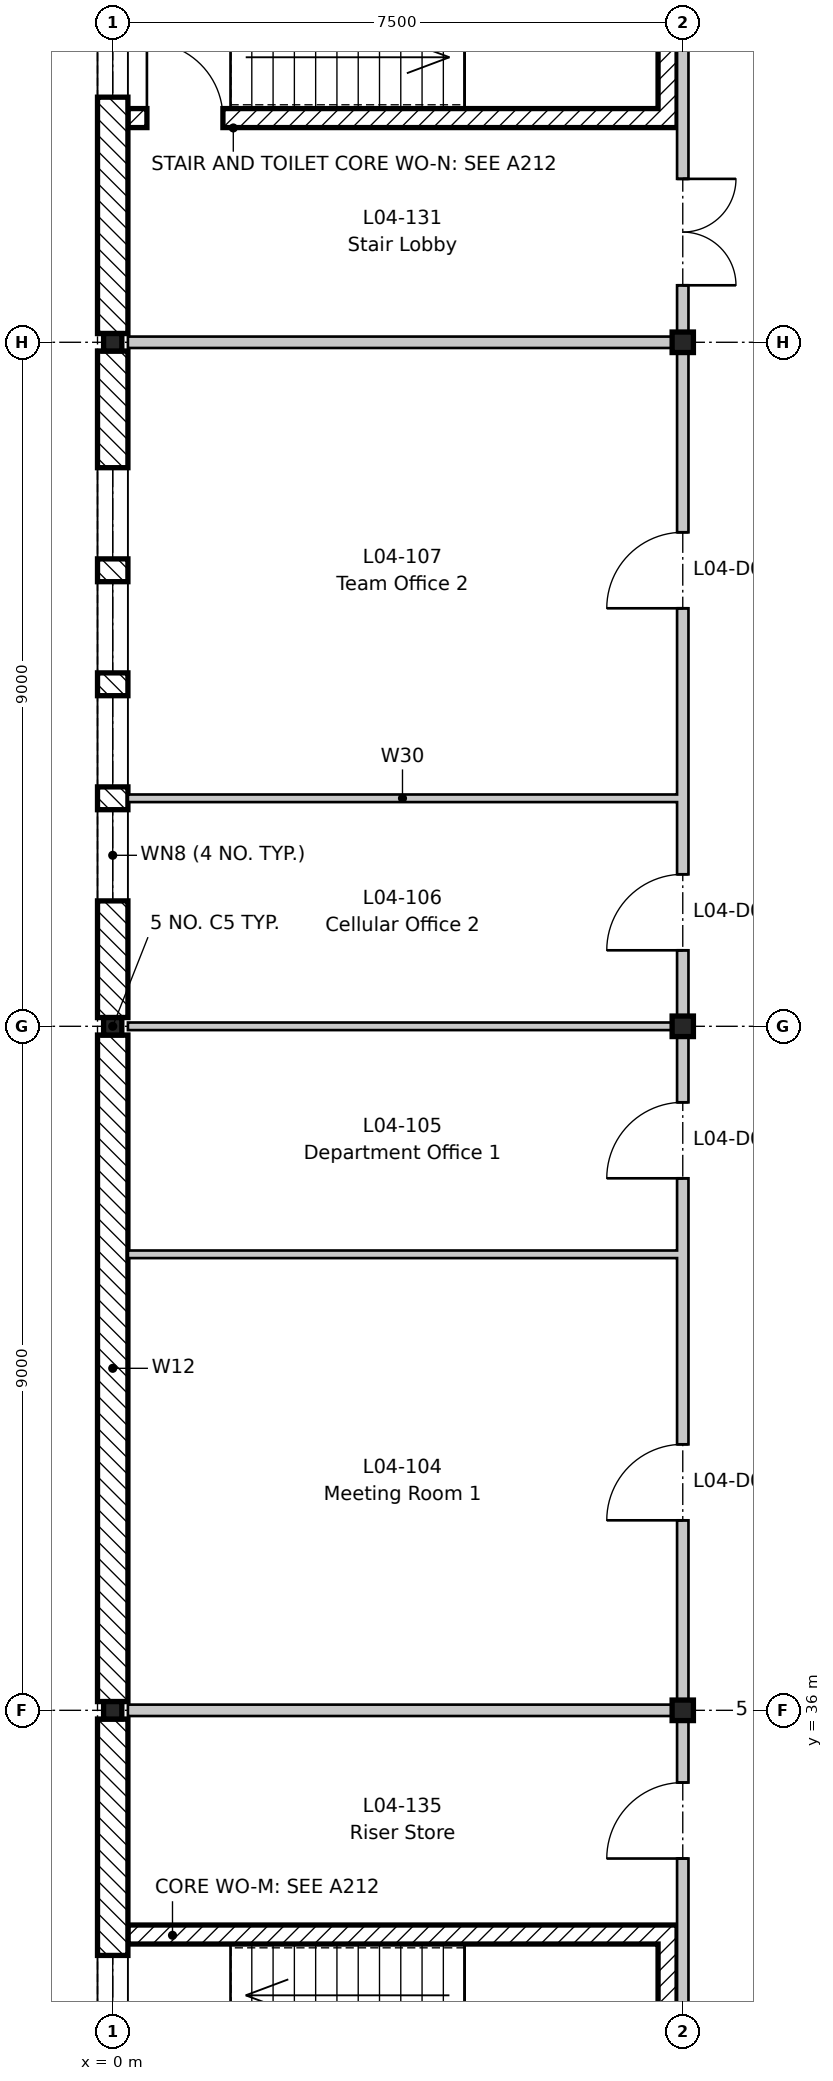
"""IFC4 building model, lengths in metres.
Left out: names, types, materials, properties, quantities, classifications, styles, units other than length and angle.
Written with IfcOpenShell. Run it as: python <this file> out.ifc"""

import sys

from ifc_helpers import new_model, si_unit, direction, frame, frame_2d, origin, origin_2d, place, context, subcontext, project, spatial, rectangle, i_section, extrude, element, fill, save


model = new_model("IFC4")
c1 = context("Model", 3, precision=1e-05, world=origin(), true_north=direction((0.0, 1.0)))
c2 = subcontext(c1, "Body", "Model", "MODEL_VIEW")
j1 = project(units=[si_unit("LENGTHUNIT", "METRE"), si_unit("PLANEANGLEUNIT", "RADIAN")], contexts=[c1])
p1 = place(None, origin())
s1 = spatial("IfcSite", under=j1, at=p1, CompositionType="ELEMENT")
p2 = place(p1, origin())
s2 = spatial("IfcBuilding", under=s1, at=p2, CompositionType="ELEMENT")
p3 = place(p2, frame((0.0, 0.0, 18.6)))
s3 = spatial("IfcBuildingStorey", under=s2, at=p3, CompositionType="ELEMENT", Elevation=18.6)
for number, where, z_axis, x_axis in (
    (1, (0.0, 36.0, -0.2), (0.0, 0.0, 1.0), (1.0, 0.0, 0.0)),
    (2, (0.0, 45.0, -0.2), (0.0, 0.0, 1.0), (1.0, 0.0, 0.0)),
    (3, (0.0, 54.0, -0.2), (0.0, 0.0, 1.0), (1.0, 0.0, 0.0)),
):
    element("IfcColumn", number, at=place(p3, frame(where, z_axis=z_axis, x_axis=x_axis)), inside=s3, PredefinedType="COLUMN", context=c2, shape_type="SweptSolid", body=[
        extrude(i_section(OverallWidth=0.24, OverallDepth=0.23, WebThickness=0.008, FlangeThickness=0.012, FilletRadius=0.021, at=origin_2d()), origin(), (0.0, 0.0, 1.0), 4.2),
    ])
for number, where, z_axis, x_axis in (
    (4, (7.5, 36.0, -0.2), (0.0, 0.0, 1.0), (1.0, 0.0, 0.0)),
    (5, (7.5, 45.0, -0.2), (0.0, 0.0, 1.0), (1.0, 0.0, 0.0)),
    (6, (7.5, 54.0, -0.2), (0.0, 0.0, 1.0), (1.0, 0.0, 0.0)),
):
    element("IfcColumn", number, at=place(p3, frame(where, z_axis=z_axis, x_axis=x_axis)), inside=s3, PredefinedType="COLUMN", context=c2, shape_type="SweptSolid", body=[
        extrude(i_section(OverallWidth=0.28, OverallDepth=0.27, WebThickness=0.008, FlangeThickness=0.013, FilletRadius=0.024, at=origin_2d()), origin(), (0.0, 0.0, 1.0), 4.2),
    ])
p4 = place(p3, frame((0.2, 56.95, 0.0), z_axis=(0.0, 0.0, 1.0), x_axis=(1.0, 0.0, 0.0)))
e7 = element("IfcWall", 7, at=p4, inside=s3, PredefinedType="SHEAR", context=c2, shape_type="SweptSolid", body=[
    extrude(rectangle(XDim=7.225, YDim=0.25, at=frame_2d((3.613, 0.0))), origin(), (0.0, 0.0, 1.0), 4.0),
])
p5 = place(p4, frame((0.25, 0.0, 0.0)))
e8 = element("IfcOpeningElement", 8, at=p5, cuts=e7, PredefinedType="OPENING", context=c2, shape_type="SweptSolid", body=[
    extrude(rectangle(XDim=1.0, YDim=2.1, at=frame_2d((0.5, 1.05))), frame((0.0, 0.135, 0.0), z_axis=(0.0, -1.0, 0.0), x_axis=(1.0, 0.0, 0.0)), (0.0, 0.0, 1.0), 0.27),
])
p6 = place(p3, frame((7.3, 57.075, 0.0), z_axis=(0.0, 0.0, 1.0), x_axis=(0.0, 1.0, 0.0)))
e9 = element("IfcWall", 9, at=p6, inside=s3, PredefinedType="SHEAR", context=c2, shape_type="SweptSolid", body=[
    extrude(rectangle(XDim=2.85, YDim=0.25, at=frame_2d((1.425, 0.0))), origin(), (0.0, 0.0, 1.0), 4.0),
])
p7 = place(p3, frame((0.2, 33.05, 0.0), z_axis=(0.0, 0.0, 1.0), x_axis=(1.0, 0.0, 0.0)))
e10 = element("IfcWall", 10, at=p7, inside=s3, PredefinedType="SHEAR", context=c2, shape_type="SweptSolid", body=[
    extrude(rectangle(XDim=7.225, YDim=0.25, at=frame_2d((3.613, 0.0))), origin(), (0.0, 0.0, 1.0), 4.0),
])
p8 = place(p3, frame((7.3, 30.075, 0.0), z_axis=(0.0, 0.0, 1.0), x_axis=(0.0, 1.0, 0.0)))
e11 = element("IfcWall", 11, at=p8, inside=s3, PredefinedType="SHEAR", context=c2, shape_type="SweptSolid", body=[
    extrude(rectangle(XDim=2.85, YDim=0.25, at=frame_2d((1.425, 0.0))), origin(), (0.0, 0.0, 1.0), 4.0),
])
p9 = place(p3, frame((0.0, 27.115, 0.0), z_axis=(0.0, 0.0, 1.0), x_axis=(0.0, 1.0, 0.0)))
e12 = element("IfcWall", 12, at=p9, inside=s3, PredefinedType="STANDARD", context=c2, shape_type="SweptSolid", body=[
    extrude(rectangle(XDim=8.77, YDim=0.4, at=frame_2d((4.385, 0.0))), origin(), (0.0, 0.0, 1.0), 3.6),
])
p10 = place(p9, frame((3.11, 0.0, 0.9)))
e13 = element("IfcOpeningElement", 13, at=p10, cuts=e12, PredefinedType="OPENING", context=c2, shape_type="SweptSolid", body=[
    extrude(rectangle(XDim=1.05, YDim=2.6, at=frame_2d((0.525, 1.3))), frame((0.0, 0.21, 0.0), z_axis=(0.0, -1.0, 0.0), x_axis=(1.0, 0.0, 0.0)), (0.0, 0.0, 1.0), 0.42),
])
p11 = place(p9, frame((4.61, 0.0, 0.9)))
e14 = element("IfcOpeningElement", 14, at=p11, cuts=e12, PredefinedType="OPENING", context=c2, shape_type="SweptSolid", body=[
    extrude(rectangle(XDim=1.05, YDim=2.6, at=frame_2d((0.525, 1.3))), frame((0.0, 0.21, 0.0), z_axis=(0.0, -1.0, 0.0), x_axis=(1.0, 0.0, 0.0)), (0.0, 0.0, 1.0), 0.42),
])
p12 = place(p3, frame((0.0, 36.115, 0.0), z_axis=(0.0, 0.0, 1.0), x_axis=(0.0, 1.0, 0.0)))
e15 = element("IfcWall", 15, at=p12, inside=s3, PredefinedType="STANDARD", context=c2, shape_type="SweptSolid", body=[
    extrude(rectangle(XDim=8.77, YDim=0.4, at=frame_2d((4.385, 0.0))), origin(), (0.0, 0.0, 1.0), 3.6),
])
p13 = place(p3, frame((0.0, 45.115, 0.0), z_axis=(0.0, 0.0, 1.0), x_axis=(0.0, 1.0, 0.0)))
e16 = element("IfcWall", 16, at=p13, inside=s3, PredefinedType="STANDARD", context=c2, shape_type="SweptSolid", body=[
    extrude(rectangle(XDim=8.77, YDim=0.4, at=frame_2d((4.385, 0.0))), origin(), (0.0, 0.0, 1.0), 3.6),
])
p14 = place(p13, frame((1.535, 0.0, 0.6)))
e17 = element("IfcOpeningElement", 17, at=p14, cuts=e16, PredefinedType="OPENING", context=c2, shape_type="SweptSolid", body=[
    extrude(rectangle(XDim=1.2, YDim=2.7, at=frame_2d((0.6, 1.35))), frame((0.0, 0.21, 0.0), z_axis=(0.0, -1.0, 0.0), x_axis=(1.0, 0.0, 0.0)), (0.0, 0.0, 1.0), 0.42),
])
p15 = place(p13, frame((3.035, 0.0, 0.6)))
e18 = element("IfcOpeningElement", 18, at=p15, cuts=e16, PredefinedType="OPENING", context=c2, shape_type="SweptSolid", body=[
    extrude(rectangle(XDim=1.2, YDim=2.7, at=frame_2d((0.6, 1.35))), frame((0.0, 0.21, 0.0), z_axis=(0.0, -1.0, 0.0), x_axis=(1.0, 0.0, 0.0)), (0.0, 0.0, 1.0), 0.42),
])
p16 = place(p13, frame((4.535, 0.0, 0.6)))
e19 = element("IfcOpeningElement", 19, at=p16, cuts=e16, PredefinedType="OPENING", context=c2, shape_type="SweptSolid", body=[
    extrude(rectangle(XDim=1.2, YDim=2.7, at=frame_2d((0.6, 1.35))), frame((0.0, 0.21, 0.0), z_axis=(0.0, -1.0, 0.0), x_axis=(1.0, 0.0, 0.0)), (0.0, 0.0, 1.0), 0.42),
])
p17 = place(p13, frame((6.035, 0.0, 0.6)))
e20 = element("IfcOpeningElement", 20, at=p17, cuts=e16, PredefinedType="OPENING", context=c2, shape_type="SweptSolid", body=[
    extrude(rectangle(XDim=1.2, YDim=2.7, at=frame_2d((0.6, 1.35))), frame((0.0, 0.21, 0.0), z_axis=(0.0, -1.0, 0.0), x_axis=(1.0, 0.0, 0.0)), (0.0, 0.0, 1.0), 0.42),
])
p18 = place(p3, frame((0.0, 54.115, 0.0), z_axis=(0.0, 0.0, 1.0), x_axis=(0.0, 1.0, 0.0)))
e21 = element("IfcWall", 21, at=p18, inside=s3, PredefinedType="STANDARD", context=c2, shape_type="SweptSolid", body=[
    extrude(rectangle(XDim=8.77, YDim=0.4, at=frame_2d((4.385, 0.0))), origin(), (0.0, 0.0, 1.0), 3.6),
])
p19 = place(p18, frame((3.11, 0.0, 0.9)))
e22 = element("IfcOpeningElement", 22, at=p19, cuts=e21, PredefinedType="OPENING", context=c2, shape_type="SweptSolid", body=[
    extrude(rectangle(XDim=1.05, YDim=2.6, at=frame_2d((0.525, 1.3))), frame((0.0, 0.21, 0.0), z_axis=(0.0, -1.0, 0.0), x_axis=(1.0, 0.0, 0.0)), (0.0, 0.0, 1.0), 0.42),
])
p20 = place(p18, frame((4.61, 0.0, 0.9)))
e23 = element("IfcOpeningElement", 23, at=p20, cuts=e21, PredefinedType="OPENING", context=c2, shape_type="SweptSolid", body=[
    extrude(rectangle(XDim=1.05, YDim=2.6, at=frame_2d((0.525, 1.3))), frame((0.0, 0.21, 0.0), z_axis=(0.0, -1.0, 0.0), x_axis=(1.0, 0.0, 0.0)), (0.0, 0.0, 1.0), 0.42),
])
p21 = place(p3, frame((0.2, 36.0, 0.0), z_axis=(0.0, 0.0, 1.0), x_axis=(1.0, 0.0, 0.0)))
e24 = element("IfcWall", 24, at=p21, inside=s3, PredefinedType="PARTITIONING", context=c2, shape_type="SweptSolid", body=[
    extrude(rectangle(XDim=7.225, YDim=0.15, at=frame_2d((3.613, 0.0))), origin(), (0.0, 0.0, 1.0), 3.65),
])
p22 = place(p3, frame((0.2, 42.0, 0.0), z_axis=(0.0, 0.0, 1.0), x_axis=(1.0, 0.0, 0.0)))
e25 = element("IfcWall", 25, at=p22, inside=s3, PredefinedType="PARTITIONING", context=c2, shape_type="SweptSolid", body=[
    extrude(rectangle(XDim=7.225, YDim=0.1, at=frame_2d((3.613, 0.0))), origin(), (0.0, 0.0, 1.0), 4.0),
])
p23 = place(p3, frame((0.2, 45.0, 0.0), z_axis=(0.0, 0.0, 1.0), x_axis=(1.0, 0.0, 0.0)))
e26 = element("IfcWall", 26, at=p23, inside=s3, PredefinedType="PARTITIONING", context=c2, shape_type="SweptSolid", body=[
    extrude(rectangle(XDim=7.225, YDim=0.1, at=frame_2d((3.613, 0.0))), origin(), (0.0, 0.0, 1.0), 3.65),
])
p24 = place(p3, frame((0.2, 48.0, 0.0), z_axis=(0.0, 0.0, 1.0), x_axis=(1.0, 0.0, 0.0)))
e27 = element("IfcWall", 27, at=p24, inside=s3, PredefinedType="PARTITIONING", context=c2, shape_type="SweptSolid", body=[
    extrude(rectangle(XDim=7.225, YDim=0.1, at=frame_2d((3.613, 0.0))), origin(), (0.0, 0.0, 1.0), 4.0),
])
p25 = place(p3, frame((0.2, 54.0, 0.0), z_axis=(0.0, 0.0, 1.0), x_axis=(1.0, 0.0, 0.0)))
e28 = element("IfcWall", 28, at=p25, inside=s3, PredefinedType="PARTITIONING", context=c2, shape_type="SweptSolid", body=[
    extrude(rectangle(XDim=7.225, YDim=0.15, at=frame_2d((3.613, 0.0))), origin(), (0.0, 0.0, 1.0), 3.65),
])
p26 = place(p3, frame((7.5, -8.8, 0.0), z_axis=(0.0, 0.0, 1.0), x_axis=(0.0, 1.0, 0.0)))
e29 = element("IfcWall", 29, at=p26, inside=s3, PredefinedType="PARTITIONING", context=c2, shape_type="SweptSolid", body=[
    extrude(rectangle(XDim=79.3, YDim=0.15, at=frame_2d((39.65, 0.0))), origin(), (0.0, 0.0, 1.0), 3.48),
])
p27 = place(p26, frame((20.3, 0.0, 0.0)))
e30 = element("IfcOpeningElement", 30, at=p27, cuts=e29, PredefinedType="OPENING", context=c2, shape_type="SweptSolid", body=[
    extrude(rectangle(XDim=1.0, YDim=2.1, at=frame_2d((0.5, 1.05))), frame((0.0, 0.085, 0.0), z_axis=(0.0, -1.0, 0.0), x_axis=(1.0, 0.0, 0.0)), (0.0, 0.0, 1.0), 0.17),
])
p28 = place(p26, frame((24.8, 0.0, 0.0)))
e31 = element("IfcOpeningElement", 31, at=p28, cuts=e29, PredefinedType="OPENING", context=c2, shape_type="SweptSolid", body=[
    extrude(rectangle(XDim=1.0, YDim=2.1, at=frame_2d((0.5, 1.05))), frame((0.0, 0.085, 0.0), z_axis=(0.0, -1.0, 0.0), x_axis=(1.0, 0.0, 0.0)), (0.0, 0.0, 1.0), 0.17),
])
p29 = place(p26, frame((30.6, 0.0, 0.0)))
e32 = element("IfcOpeningElement", 32, at=p29, cuts=e29, PredefinedType="OPENING", context=c2, shape_type="SweptSolid", body=[
    extrude(rectangle(XDim=1.4, YDim=2.1, at=frame_2d((0.7, 1.05))), frame((0.0, 0.085, 0.0), z_axis=(0.0, -1.0, 0.0), x_axis=(1.0, 0.0, 0.0)), (0.0, 0.0, 1.0), 0.17),
])
p30 = place(p26, frame((47.3, 0.0, 0.0)))
e33 = element("IfcOpeningElement", 33, at=p30, cuts=e29, PredefinedType="OPENING", context=c2, shape_type="SweptSolid", body=[
    extrude(rectangle(XDim=1.0, YDim=2.1, at=frame_2d((0.5, 1.05))), frame((0.0, 0.085, 0.0), z_axis=(0.0, -1.0, 0.0), x_axis=(1.0, 0.0, 0.0)), (0.0, 0.0, 1.0), 0.17),
])
p31 = place(p26, frame((51.8, 0.0, 0.0)))
e34 = element("IfcOpeningElement", 34, at=p31, cuts=e29, PredefinedType="OPENING", context=c2, shape_type="SweptSolid", body=[
    extrude(rectangle(XDim=1.0, YDim=2.1, at=frame_2d((0.5, 1.05))), frame((0.0, 0.085, 0.0), z_axis=(0.0, -1.0, 0.0), x_axis=(1.0, 0.0, 0.0)), (0.0, 0.0, 1.0), 0.17),
])
p32 = place(p26, frame((54.8, 0.0, 0.0)))
e35 = element("IfcOpeningElement", 35, at=p32, cuts=e29, PredefinedType="OPENING", context=c2, shape_type="SweptSolid", body=[
    extrude(rectangle(XDim=1.0, YDim=2.1, at=frame_2d((0.5, 1.05))), frame((0.0, 0.085, 0.0), z_axis=(0.0, -1.0, 0.0), x_axis=(1.0, 0.0, 0.0)), (0.0, 0.0, 1.0), 0.17),
])
p33 = place(p26, frame((59.3, 0.0, 0.0)))
e36 = element("IfcOpeningElement", 36, at=p33, cuts=e29, PredefinedType="OPENING", context=c2, shape_type="SweptSolid", body=[
    extrude(rectangle(XDim=1.0, YDim=2.1, at=frame_2d((0.5, 1.05))), frame((0.0, 0.085, 0.0), z_axis=(0.0, -1.0, 0.0), x_axis=(1.0, 0.0, 0.0)), (0.0, 0.0, 1.0), 0.17),
])
p34 = place(p26, frame((12.6, 0.0, 0.0)))
e37 = element("IfcOpeningElement", 37, at=p34, cuts=e29, PredefinedType="OPENING", context=c2, shape_type="SweptSolid", body=[
    extrude(rectangle(XDim=1.4, YDim=2.1, at=frame_2d((0.7, 1.05))), frame((0.0, 0.085, 0.0), z_axis=(0.0, -1.0, 0.0), x_axis=(1.0, 0.0, 0.0)), (0.0, 0.0, 1.0), 0.17),
])
p35 = place(p26, frame((3.6, 0.0, 0.0)))
e38 = element("IfcOpeningElement", 38, at=p35, cuts=e29, PredefinedType="OPENING", context=c2, shape_type="SweptSolid", body=[
    extrude(rectangle(XDim=1.4, YDim=2.1, at=frame_2d((0.7, 1.05))), frame((0.0, 0.085, 0.0), z_axis=(0.0, -1.0, 0.0), x_axis=(1.0, 0.0, 0.0)), (0.0, 0.0, 1.0), 0.17),
])
p36 = place(p26, frame((63.55, 0.0, 0.0)))
e39 = element("IfcOpeningElement", 39, at=p36, cuts=e29, PredefinedType="OPENING", context=c2, shape_type="SweptSolid", body=[
    extrude(rectangle(XDim=1.4, YDim=2.1, at=frame_2d((0.7, 1.05))), frame((0.0, 0.085, 0.0), z_axis=(0.0, -1.0, 0.0), x_axis=(1.0, 0.0, 0.0)), (0.0, 0.0, 1.0), 0.17),
])
p37 = place(p26, frame((69.6, 0.0, 0.0)))
e40 = element("IfcOpeningElement", 40, at=p37, cuts=e29, PredefinedType="OPENING", context=c2, shape_type="SweptSolid", body=[
    extrude(rectangle(XDim=1.4, YDim=2.1, at=frame_2d((0.7, 1.05))), frame((0.0, 0.085, 0.0), z_axis=(0.0, -1.0, 0.0), x_axis=(1.0, 0.0, 0.0)), (0.0, 0.0, 1.0), 0.17),
])
p38 = place(p26, frame((42.85, 0.0, 0.0)))
e41 = element("IfcOpeningElement", 41, at=p38, cuts=e29, PredefinedType="OPENING", context=c2, shape_type="SweptSolid", body=[
    extrude(rectangle(XDim=1.0, YDim=2.1, at=frame_2d((0.5, 1.05))), frame((0.0, 0.085, 0.0), z_axis=(0.0, -1.0, 0.0), x_axis=(1.0, 0.0, 0.0)), (0.0, 0.0, 1.0), 0.17),
])
p39 = place(p26, frame((36.55, 0.0, 0.0)))
e42 = element("IfcOpeningElement", 42, at=p39, cuts=e29, PredefinedType="OPENING", context=c2, shape_type="SweptSolid", body=[
    extrude(rectangle(XDim=1.4, YDim=2.1, at=frame_2d((0.7, 1.05))), frame((0.0, 0.085, 0.0), z_axis=(0.0, -1.0, 0.0), x_axis=(1.0, 0.0, 0.0)), (0.0, 0.0, 1.0), 0.17),
])
p40 = place(p26, frame((72.8, 0.0, 0.0)))
e43 = element("IfcOpeningElement", 43, at=p40, cuts=e29, PredefinedType="OPENING", context=c2, shape_type="SweptSolid", body=[
    extrude(rectangle(XDim=1.0, YDim=2.1, at=frame_2d((0.5, 1.05))), frame((0.0, 0.085, 0.0), z_axis=(0.0, -1.0, 0.0), x_axis=(1.0, 0.0, 0.0)), (0.0, 0.0, 1.0), 0.17),
])
p41 = place(p11, origin())
e44 = element("IfcWindow", 44, at=p41, inside=s3, PartitioningType="SINGLE_PANEL", PredefinedType="WINDOW", context=c2, shape_type="SweptSolid", body=[
    extrude(rectangle(XDim=1.05, YDim=2.6, at=frame_2d((0.525, 1.3))), frame((0.0, 0.03, 0.0), z_axis=(0.0, -1.0, 0.0), x_axis=(1.0, 0.0, 0.0)), (0.0, 0.0, 1.0), 0.06),
])
fill(e14, e44)
p42 = place(p14, origin())
e45 = element("IfcWindow", 45, at=p42, inside=s3, PartitioningType="SINGLE_PANEL", PredefinedType="WINDOW", context=c2, shape_type="SweptSolid", body=[
    extrude(rectangle(XDim=1.2, YDim=2.7, at=frame_2d((0.6, 1.35))), frame((0.0, 0.03, 0.0), z_axis=(0.0, -1.0, 0.0), x_axis=(1.0, 0.0, 0.0)), (0.0, 0.0, 1.0), 0.06),
])
fill(e17, e45)
p43 = place(p15, origin())
e46 = element("IfcWindow", 46, at=p43, inside=s3, PartitioningType="SINGLE_PANEL", PredefinedType="WINDOW", context=c2, shape_type="SweptSolid", body=[
    extrude(rectangle(XDim=1.2, YDim=2.7, at=frame_2d((0.6, 1.35))), frame((0.0, 0.03, 0.0), z_axis=(0.0, -1.0, 0.0), x_axis=(1.0, 0.0, 0.0)), (0.0, 0.0, 1.0), 0.06),
])
fill(e18, e46)
p44 = place(p16, origin())
e47 = element("IfcWindow", 47, at=p44, inside=s3, PartitioningType="SINGLE_PANEL", PredefinedType="WINDOW", context=c2, shape_type="SweptSolid", body=[
    extrude(rectangle(XDim=1.2, YDim=2.7, at=frame_2d((0.6, 1.35))), frame((0.0, 0.03, 0.0), z_axis=(0.0, -1.0, 0.0), x_axis=(1.0, 0.0, 0.0)), (0.0, 0.0, 1.0), 0.06),
])
fill(e19, e47)
p45 = place(p17, origin())
e48 = element("IfcWindow", 48, at=p45, inside=s3, PartitioningType="SINGLE_PANEL", PredefinedType="WINDOW", context=c2, shape_type="SweptSolid", body=[
    extrude(rectangle(XDim=1.2, YDim=2.7, at=frame_2d((0.6, 1.35))), frame((0.0, 0.03, 0.0), z_axis=(0.0, -1.0, 0.0), x_axis=(1.0, 0.0, 0.0)), (0.0, 0.0, 1.0), 0.06),
])
fill(e20, e48)
p46 = place(p19, origin())
e49 = element("IfcWindow", 49, at=p46, inside=s3, PartitioningType="SINGLE_PANEL", PredefinedType="WINDOW", context=c2, shape_type="SweptSolid", body=[
    extrude(rectangle(XDim=1.05, YDim=2.6, at=frame_2d((0.525, 1.3))), frame((0.0, 0.03, 0.0), z_axis=(0.0, -1.0, 0.0), x_axis=(1.0, 0.0, 0.0)), (0.0, 0.0, 1.0), 0.06),
])
fill(e22, e49)
p47 = place(p30, origin())
e50 = element("IfcDoor", 50, at=p47, inside=s3, OperationType="SINGLE_SWING_LEFT", PredefinedType="DOOR", context=c2, shape_type="SweptSolid", body=[
    extrude(rectangle(XDim=1.0, YDim=2.1, at=frame_2d((0.5, 1.05))), frame((0.0, 0.025, 0.0), z_axis=(0.0, -1.0, 0.0), x_axis=(1.0, 0.0, 0.0)), (0.0, 0.0, 1.0), 0.05),
])
fill(e33, e50)
p48 = place(p31, origin())
e51 = element("IfcDoor", 51, at=p48, inside=s3, OperationType="SINGLE_SWING_LEFT", PredefinedType="DOOR", context=c2, shape_type="SweptSolid", body=[
    extrude(rectangle(XDim=1.0, YDim=2.1, at=frame_2d((0.5, 1.05))), frame((0.0, 0.025, 0.0), z_axis=(0.0, -1.0, 0.0), x_axis=(1.0, 0.0, 0.0)), (0.0, 0.0, 1.0), 0.05),
])
fill(e34, e51)
p49 = place(p32, origin())
e52 = element("IfcDoor", 52, at=p49, inside=s3, OperationType="SINGLE_SWING_LEFT", PredefinedType="DOOR", context=c2, shape_type="SweptSolid", body=[
    extrude(rectangle(XDim=1.0, YDim=2.1, at=frame_2d((0.5, 1.05))), frame((0.0, 0.025, 0.0), z_axis=(0.0, -1.0, 0.0), x_axis=(1.0, 0.0, 0.0)), (0.0, 0.0, 1.0), 0.05),
])
fill(e35, e52)
p50 = place(p33, origin())
e53 = element("IfcDoor", 53, at=p50, inside=s3, OperationType="SINGLE_SWING_LEFT", PredefinedType="DOOR", context=c2, shape_type="SweptSolid", body=[
    extrude(rectangle(XDim=1.0, YDim=2.1, at=frame_2d((0.5, 1.05))), frame((0.0, 0.025, 0.0), z_axis=(0.0, -1.0, 0.0), x_axis=(1.0, 0.0, 0.0)), (0.0, 0.0, 1.0), 0.05),
])
fill(e36, e53)
p51 = place(p5, origin())
e54 = element("IfcDoor", 54, at=p51, inside=s3, OperationType="SINGLE_SWING_LEFT", PredefinedType="DOOR", context=c2, shape_type="SweptSolid", body=[
    extrude(rectangle(XDim=1.0, YDim=2.1, at=frame_2d((0.5, 1.05))), frame((0.0, 0.025, 0.0), z_axis=(0.0, -1.0, 0.0), x_axis=(1.0, 0.0, 0.0)), (0.0, 0.0, 1.0), 0.05),
])
fill(e8, e54)
p52 = place(p36, frame((1.4, 0.0, 0.0), z_axis=(0.0, 0.0, 1.0), x_axis=(-1.0, 0.0, 0.0)))
e55 = element("IfcDoor", 55, at=p52, inside=s3, OperationType="DOUBLE_DOOR_SINGLE_SWING", PredefinedType="DOOR", context=c2, shape_type="SweptSolid", body=[
    extrude(rectangle(XDim=1.4, YDim=2.1, at=frame_2d((0.7, 1.05))), frame((0.0, 0.025, 0.0), z_axis=(0.0, -1.0, 0.0), x_axis=(1.0, 0.0, 0.0)), (0.0, 0.0, 1.0), 0.05),
])
fill(e39, e55)
p53 = place(p38, origin())
e56 = element("IfcDoor", 56, at=p53, inside=s3, OperationType="SINGLE_SWING_LEFT", PredefinedType="DOOR", context=c2, shape_type="SweptSolid", body=[
    extrude(rectangle(XDim=1.0, YDim=2.1, at=frame_2d((0.5, 1.05))), frame((0.0, 0.025, 0.0), z_axis=(0.0, -1.0, 0.0), x_axis=(1.0, 0.0, 0.0)), (0.0, 0.0, 1.0), 0.05),
])
fill(e41, e56)
save(model, sys.argv[1])
